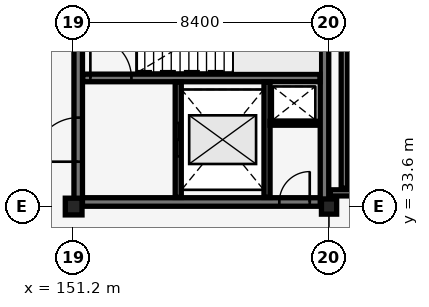
"""IFC4 building model, lengths in metres.
Left out: names, types, materials, properties, quantities, classifications, styles, units other than length and angle.
Written with IfcOpenShell. Run it as: python <this file> out.ifc"""

import sys

from ifc_helpers import new_model, si_unit, direction, frame, frame_2d, origin, origin_2d, place, context, subcontext, project, spatial, rectangle, extrude, element, fill, save


model = new_model("IFC4")
c1 = context("Model", 3, precision=1e-05, world=origin(), true_north=direction((0.0, 1.0)))
c2 = subcontext(c1, "Body", "Model", "MODEL_VIEW")
j1 = project(units=[si_unit("LENGTHUNIT", "METRE"), si_unit("PLANEANGLEUNIT", "RADIAN")], contexts=[c1])
p1 = place(None, origin())
s1 = spatial("IfcSite", under=j1, at=p1, CompositionType="ELEMENT")
p2 = place(p1, origin())
s2 = spatial("IfcBuilding", under=s1, at=p2, CompositionType="ELEMENT")
p3 = place(p2, frame((0.0, 0.0, 22.1)))
s3 = spatial("IfcBuildingStorey", under=s2, at=p3, CompositionType="ELEMENT", Elevation=22.1)
p4 = place(p3, frame((151.35, 33.75, 0.0), z_axis=(0.0, 0.0, 1.0), x_axis=(1.0, 0.0, 0.0)))
e1 = element("IfcWall", 1, at=p4, inside=s3, PredefinedType="SHEAR", context=c2, shape_type="SweptSolid", body=[
    extrude(rectangle(XDim=8.1, YDim=0.28, at=frame_2d((4.05, 0.0))), origin(), (0.0, 0.0, 1.0), 3.78),
])
p5 = place(p4, frame((6.615, 0.0, 0.0)))
e2 = element("IfcOpeningElement", 2, at=p5, cuts=e1, PredefinedType="OPENING", context=c2, shape_type="SweptSolid", body=[
    extrude(rectangle(XDim=1.0, YDim=2.15, at=frame_2d((0.5, 1.075))), frame((0.0, 0.15, 0.0), z_axis=(0.0, -1.0, 0.0), x_axis=(1.0, 0.0, 0.0)), (0.0, 0.0, 1.0), 0.3),
])
p6 = place(p3, frame((151.35, 33.75, 0.0), z_axis=(0.0, 0.0, 1.0), x_axis=(0.0, 1.0, 0.0)))
e3 = element("IfcWall", 3, at=p6, inside=s3, PredefinedType="SHEAR", context=c2, shape_type="SweptSolid", body=[
    extrude(rectangle(XDim=8.1, YDim=0.28, at=frame_2d((4.05, 0.0))), origin(), (0.0, 0.0, 1.0), 3.78),
])
p7 = place(p6, frame((1.325, 0.0, 0.0)))
e4 = element("IfcOpeningElement", 4, at=p7, cuts=e3, PredefinedType="OPENING", context=c2, shape_type="SweptSolid", body=[
    extrude(rectangle(XDim=1.45, YDim=2.15, at=frame_2d((0.725, 1.075))), frame((0.0, 0.15, 0.0), z_axis=(0.0, -1.0, 0.0), x_axis=(1.0, 0.0, 0.0)), (0.0, 0.0, 1.0), 0.3),
])
p8 = place(p3, frame((159.45, 33.75, 0.0), z_axis=(0.0, 0.0, 1.0), x_axis=(0.0, 1.0, 0.0)))
e5 = element("IfcWall", 5, at=p8, inside=s3, PredefinedType="SHEAR", context=c2, shape_type="SweptSolid", body=[
    extrude(rectangle(XDim=8.1, YDim=0.28, at=frame_2d((4.05, 0.0))), origin(), (0.0, 0.0, 1.0), 3.78),
])
p9 = place(p3, frame((151.5, 37.83, 0.0), z_axis=(0.0, 0.0, 1.0), x_axis=(1.0, 0.0, 0.0)))
e6 = element("IfcWall", 6, at=p9, inside=s3, PredefinedType="SHEAR", context=c2, shape_type="SweptSolid", body=[
    extrude(rectangle(XDim=7.8, YDim=0.25, at=frame_2d((3.9, 0.0))), origin(), (0.0, 0.0, 1.0), 3.78),
])
p10 = place(p9, frame((0.25, 0.0, 0.0)))
e7 = element("IfcOpeningElement", 7, at=p10, cuts=e6, PredefinedType="OPENING", context=c2, shape_type="SweptSolid", body=[
    extrude(rectangle(XDim=1.35, YDim=2.15, at=frame_2d((0.675, 1.075))), frame((0.0, 0.135, 0.0), z_axis=(0.0, -1.0, 0.0), x_axis=(1.0, 0.0, 0.0)), (0.0, 0.0, 1.0), 0.27),
])
p11 = place(p3, frame((151.2, 33.6, 0.0), z_axis=(0.0, 0.0, 1.0), x_axis=(1.0, 0.0, 0.0)))
e8 = element("IfcColumn", 8, at=p11, inside=s3, PredefinedType="COLUMN", context=c2, shape_type="SweptSolid", body=[
    extrude(rectangle(XDim=0.55, YDim=0.55, at=origin_2d()), origin(), (0.0, 0.0, 1.0), 3.78),
])
p12 = place(p3, frame((159.6, 33.6, 0.0), z_axis=(0.0, 0.0, 1.0), x_axis=(1.0, 0.0, 0.0)))
e9 = element("IfcColumn", 9, at=p12, inside=s3, PredefinedType="COLUMN", context=c2, shape_type="SweptSolid", body=[
    extrude(rectangle(XDim=0.5, YDim=0.5, at=origin_2d()), origin(), (0.0, 0.0, 1.0), 3.78),
])
p13 = place(p3, frame((154.64, 33.9, 0.0), z_axis=(0.0, 0.0, 1.0), x_axis=(0.0, 1.0, 0.0)))
e10 = element("IfcWall", 10, at=p13, inside=s3, PredefinedType="SHEAR", context=c2, shape_type="SweptSolid", body=[
    extrude(rectangle(XDim=3.8, YDim=0.2, at=frame_2d((1.9, 0.0))), origin(), (0.0, 0.0, 1.0), 3.08),
])
p14 = place(p13, frame((1.35, 0.0, 0.0)))
e11 = element("IfcOpeningElement", 11, at=p14, cuts=e10, PredefinedType="OPENING", context=c2, shape_type="SweptSolid", body=[
    extrude(rectangle(XDim=1.1, YDim=2.15, at=frame_2d((0.55, 1.075))), frame((0.0, 0.11, 0.0), z_axis=(0.0, -1.0, 0.0), x_axis=(1.0, 0.0, 0.0)), (0.0, 0.0, 1.0), 0.22),
])
p15 = place(p3, frame((157.56, 33.9, 0.0), z_axis=(0.0, 0.0, 1.0), x_axis=(0.0, 1.0, 0.0)))
e12 = element("IfcWall", 12, at=p15, inside=s3, PredefinedType="SHEAR", context=c2, shape_type="SweptSolid", body=[
    extrude(rectangle(XDim=3.8, YDim=0.2, at=frame_2d((1.9, 0.0))), origin(), (0.0, 0.0, 1.0), 3.08),
])
p16 = place(p3, frame((157.66, 36.34, 0.0), z_axis=(0.0, 0.0, 1.0), x_axis=(1.0, 0.0, 0.0)))
e13 = element("IfcWall", 13, at=p16, inside=s3, PredefinedType="PARTITIONING", context=c2, shape_type="SweptSolid", body=[
    extrude(rectangle(XDim=1.62, YDim=0.13, at=frame_2d((0.81, 0.0))), origin(), (0.0, 0.0, 1.0), 3.78),
])
p17 = place(p3, frame((160.1, 34.2, 0.0), z_axis=(0.0, 0.0, 1.0), x_axis=(0.0, 1.0, 0.0)))
e14 = element("IfcWall", 14, at=p17, inside=s3, PredefinedType="PARTITIONING", context=c2, shape_type="SweptSolid", body=[
    extrude(rectangle(XDim=40.8, YDim=0.2, at=frame_2d((20.4, 0.0))), origin(), (0.0, 0.0, 1.0), 3.78),
])
p18 = place(p17, frame((19.65, 0.0, 0.0)))
e15 = element("IfcOpeningElement", 15, at=p18, cuts=e14, PredefinedType="OPENING", context=c2, shape_type="SweptSolid", body=[
    extrude(rectangle(XDim=1.5, YDim=2.2, at=frame_2d((0.75, 1.1))), frame((0.0, 0.11, 0.0), z_axis=(0.0, -1.0, 0.0), x_axis=(1.0, 0.0, 0.0)), (0.0, 0.0, 1.0), 0.22),
])
p19 = place(p3, frame((159.63, 34.05, 0.0), z_axis=(0.0, 0.0, 1.0), x_axis=(1.0, 0.0, 0.0)))
e16 = element("IfcWall", 16, at=p19, inside=s3, PredefinedType="PARTITIONING", context=c2, shape_type="SweptSolid", body=[
    extrude(rectangle(XDim=8.19, YDim=0.2, at=frame_2d((4.095, 0.0))), origin(), (0.0, 0.0, 1.0), 3.18),
])
p20 = place(p10, origin())
e17 = element("IfcDoor", 17, at=p20, inside=s3, OperationType="SINGLE_SWING_LEFT", PredefinedType="DOOR", context=c2, shape_type="SweptSolid", body=[
    extrude(rectangle(XDim=1.35, YDim=2.15, at=frame_2d((0.675, 1.075))), frame((0.0, 0.025, 0.0), z_axis=(0.0, -1.0, 0.0), x_axis=(1.0, 0.0, 0.0)), (0.0, 0.0, 1.0), 0.05),
])
fill(e7, e17)
p21 = place(p14, origin())
e18 = element("IfcDoor", 18, at=p21, inside=s3, OperationType="SLIDING_TO_LEFT", PredefinedType="DOOR", context=c2, shape_type="SweptSolid", body=[
    extrude(rectangle(XDim=1.1, YDim=2.15, at=frame_2d((0.55, 1.075))), frame((0.0, 0.025, 0.0), z_axis=(0.0, -1.0, 0.0), x_axis=(1.0, 0.0, 0.0)), (0.0, 0.0, 1.0), 0.05),
])
fill(e11, e18)
p22 = place(p7, origin())
e19 = element("IfcDoor", 19, at=p22, inside=s3, OperationType="DOUBLE_DOOR_SINGLE_SWING", PredefinedType="DOOR", context=c2, shape_type="SweptSolid", body=[
    extrude(rectangle(XDim=1.45, YDim=2.15, at=frame_2d((0.725, 1.075))), frame((0.0, 0.025, 0.0), z_axis=(0.0, -1.0, 0.0), x_axis=(1.0, 0.0, 0.0)), (0.0, 0.0, 1.0), 0.05),
])
fill(e4, e19)
p23 = place(p5, origin())
e20 = element("IfcDoor", 20, at=p23, inside=s3, OperationType="SINGLE_SWING_RIGHT", PredefinedType="DOOR", context=c2, shape_type="SweptSolid", body=[
    extrude(rectangle(XDim=1.0, YDim=2.15, at=frame_2d((0.5, 1.075))), frame((0.0, 0.025, 0.0), z_axis=(0.0, -1.0, 0.0), x_axis=(1.0, 0.0, 0.0)), (0.0, 0.0, 1.0), 0.05),
])
fill(e2, e20)
save(model, sys.argv[1])
